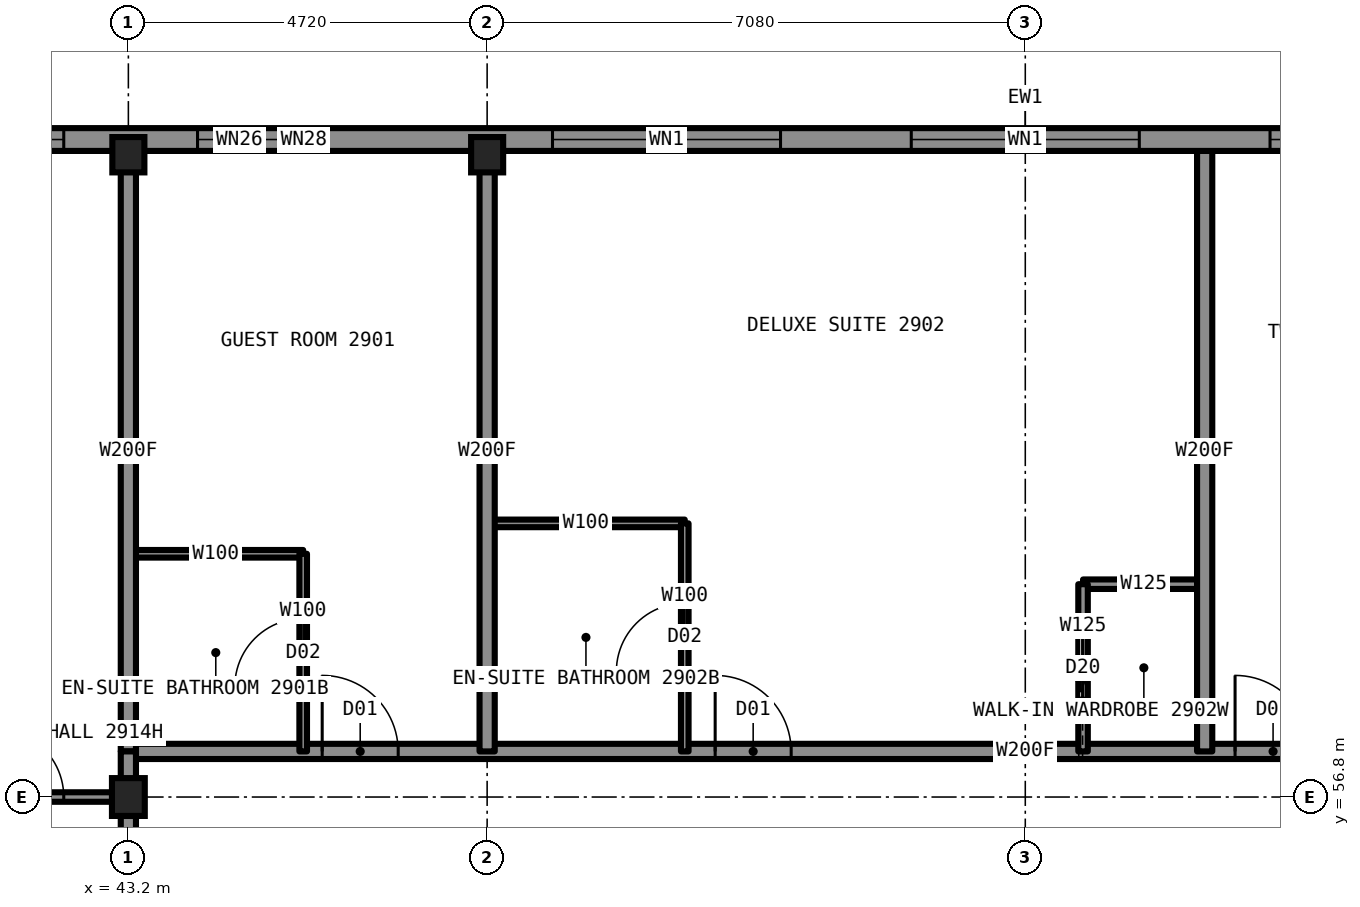
"""IFC4 building model, lengths in metres.
Left out: names, types, materials, properties, quantities, classifications, styles, units other than length and angle.
Written with IfcOpenShell. Run it as: python <this file> out.ifc"""

import sys

from ifc_helpers import new_model, si_unit, direction, frame, frame_2d, origin, origin_2d, place, context, subcontext, project, spatial, rectangle, i_section, extrude, element, fill, save


model = new_model("IFC4")
c1 = context("Model", 3, precision=1e-05, world=origin(), true_north=direction((0.0, 1.0)))
c2 = subcontext(c1, "Body", "Model", "MODEL_VIEW")
j1 = project(units=[si_unit("LENGTHUNIT", "METRE"), si_unit("PLANEANGLEUNIT", "RADIAN")], contexts=[c1])
p1 = place(None, origin())
s1 = spatial("IfcSite", under=j1, at=p1, CompositionType="ELEMENT")
p2 = place(p1, origin())
s2 = spatial("IfcBuilding", under=s1, at=p2, CompositionType="ELEMENT")
p3 = place(p2, frame((0.0, 0.0, 103.9)))
s3 = spatial("IfcBuildingStorey", under=s2, at=p3, CompositionType="ELEMENT", Elevation=103.9)
for number, where, z_axis, x_axis in (
    (1, (43.2, 65.25, 0.0), (0.0, 0.0, 1.0), (1.0, 0.0, 0.0)),
    (2, (47.92, 65.25, 0.0), (0.0, 0.0, 1.0), (1.0, 0.0, 0.0)),
):
    element("IfcColumn", number, at=place(p3, frame(where, z_axis=z_axis, x_axis=x_axis)), inside=s3, PredefinedType="COLUMN", context=c2, shape_type="SweptSolid", body=[
        extrude(i_section(OverallWidth=0.422, OverallDepth=0.465, WebThickness=0.045, FlangeThickness=0.073, at=origin_2d()), origin(), (0.0, 0.0, 1.0), 3.5),
    ])
p4 = place(p3, frame((43.2, 56.8, 0.0), z_axis=(0.0, 0.0, 1.0), x_axis=(1.0, 0.0, 0.0)))
e3 = element("IfcColumn", 3, at=p4, inside=s3, PredefinedType="COLUMN", context=c2, shape_type="SweptSolid", body=[
    extrude(i_section(OverallWidth=0.432, OverallDepth=0.498, WebThickness=0.056, FlangeThickness=0.089, at=origin_2d()), origin(), (0.0, 0.0, 1.0), 3.5),
])
p5 = place(p3, frame((34.7, 56.8, 0.0), z_axis=(0.0, 0.0, 1.0), x_axis=(1.0, 0.0, 0.0)))
e4 = element("IfcWall", 4, at=p5, inside=s3, PredefinedType="PARTITIONING", context=c2, shape_type="SweptSolid", body=[
    extrude(rectangle(XDim=8.5, YDim=0.125, at=frame_2d((4.25, 0.0))), origin(), (0.0, 0.0, 1.0), 2.573),
])
p6 = place(p5, frame((6.75, 0.0, 0.0)))
e5 = element("IfcOpeningElement", 5, at=p6, cuts=e4, PredefinedType="OPENING", context=c2, shape_type="SweptSolid", body=[
    extrude(rectangle(XDim=0.9, YDim=2.2, at=frame_2d((0.45, 1.1))), frame((0.0, 0.073, 0.0), z_axis=(0.0, -1.0, 0.0), x_axis=(1.0, 0.0, 0.0)), (0.0, 0.0, 1.0), 0.145),
])
p7 = place(p3, frame((43.2, 57.4, 0.0), z_axis=(0.0, 0.0, 1.0), x_axis=(1.0, 0.0, 0.0)))
e6 = element("IfcWall", 6, at=p7, inside=s3, PredefinedType="PARTITIONING", context=c2, shape_type="SweptSolid", body=[
    extrude(rectangle(XDim=23.6, YDim=0.2, at=frame_2d((11.8, 0.0))), origin(), (0.0, 0.0, 1.0), 3.33),
])
p8 = place(p7, frame((2.55, 0.0, 0.0)))
e7 = element("IfcOpeningElement", 7, at=p8, cuts=e6, PredefinedType="OPENING", context=c2, shape_type="SweptSolid", body=[
    extrude(rectangle(XDim=1.0, YDim=2.2, at=frame_2d((0.5, 1.1))), frame((0.0, 0.11, 0.0), z_axis=(0.0, -1.0, 0.0), x_axis=(1.0, 0.0, 0.0)), (0.0, 0.0, 1.0), 0.22),
])
p9 = place(p7, frame((7.72, 0.0, 0.0)))
e8 = element("IfcOpeningElement", 8, at=p9, cuts=e6, PredefinedType="OPENING", context=c2, shape_type="SweptSolid", body=[
    extrude(rectangle(XDim=1.0, YDim=2.2, at=frame_2d((0.5, 1.1))), frame((0.0, 0.11, 0.0), z_axis=(0.0, -1.0, 0.0), x_axis=(1.0, 0.0, 0.0)), (0.0, 0.0, 1.0), 0.22),
])
p10 = place(p7, frame((14.56, 0.0, 0.0)))
e9 = element("IfcOpeningElement", 9, at=p10, cuts=e6, PredefinedType="OPENING", context=c2, shape_type="SweptSolid", body=[
    extrude(rectangle(XDim=1.0, YDim=2.2, at=frame_2d((0.5, 1.1))), frame((0.0, 0.11, 0.0), z_axis=(0.0, -1.0, 0.0), x_axis=(1.0, 0.0, 0.0)), (0.0, 0.0, 1.0), 0.22),
])
p11 = place(p7, frame((20.34, 0.0, 0.0)))
e10 = element("IfcOpeningElement", 10, at=p11, cuts=e6, PredefinedType="OPENING", context=c2, shape_type="SweptSolid", body=[
    extrude(rectangle(XDim=1.0, YDim=2.2, at=frame_2d((0.5, 1.1))), frame((0.0, 0.11, 0.0), z_axis=(0.0, -1.0, 0.0), x_axis=(1.0, 0.0, 0.0)), (0.0, 0.0, 1.0), 0.22),
])
p12 = place(p3, frame((55.76, 59.6, 0.0), z_axis=(0.0, 0.0, 1.0), x_axis=(1.0, 0.0, 0.0)))
e11 = element("IfcWall", 11, at=p12, inside=s3, PredefinedType="PARTITIONING", context=c2, shape_type="SweptSolid", body=[
    extrude(rectangle(XDim=1.6, YDim=0.125, at=frame_2d((0.8, 0.0))), origin(), (0.0, 0.0, 1.0), 3.33),
])
p13 = place(p3, frame((43.2, 60.0, 0.0), z_axis=(0.0, 0.0, 1.0), x_axis=(1.0, 0.0, 0.0)))
e12 = element("IfcWall", 12, at=p13, inside=s3, PredefinedType="PARTITIONING", context=c2, shape_type="SweptSolid", body=[
    extrude(rectangle(XDim=2.3, YDim=0.1, at=frame_2d((1.15, 0.0))), origin(), (0.0, 0.0, 1.0), 2.731),
])
p14 = place(p3, frame((47.92, 60.4, 0.0), z_axis=(0.0, 0.0, 1.0), x_axis=(1.0, 0.0, 0.0)))
e13 = element("IfcWall", 13, at=p14, inside=s3, PredefinedType="PARTITIONING", context=c2, shape_type="SweptSolid", body=[
    extrude(rectangle(XDim=2.6, YDim=0.1, at=frame_2d((1.3, 0.0))), origin(), (0.0, 0.0, 1.0), 3.33),
])
p15 = place(p3, frame((43.2, 33.2, 0.0), z_axis=(0.0, 0.0, 1.0), x_axis=(0.0, 1.0, 0.0)))
e14 = element("IfcWall", 14, at=p15, inside=s3, PredefinedType="PARTITIONING", context=c2, shape_type="SweptSolid", body=[
    extrude(rectangle(XDim=23.58, YDim=0.2, at=frame_2d((11.79, 0.0))), origin(), (0.0, 0.0, 1.0), 3.33),
])
p16 = place(p15, frame((7.72, 0.0, 0.0)))
e15 = element("IfcOpeningElement", 15, at=p16, cuts=e14, PredefinedType="OPENING", context=c2, shape_type="SweptSolid", body=[
    extrude(rectangle(XDim=1.0, YDim=2.2, at=frame_2d((0.5, 1.1))), frame((0.0, 0.11, 0.0), z_axis=(0.0, -1.0, 0.0), x_axis=(1.0, 0.0, 0.0)), (0.0, 0.0, 1.0), 0.22),
])
p17 = place(p15, frame((14.56, 0.0, 0.0)))
e16 = element("IfcOpeningElement", 16, at=p17, cuts=e14, PredefinedType="OPENING", context=c2, shape_type="SweptSolid", body=[
    extrude(rectangle(XDim=1.0, YDim=2.2, at=frame_2d((0.5, 1.1))), frame((0.0, 0.11, 0.0), z_axis=(0.0, -1.0, 0.0), x_axis=(1.0, 0.0, 0.0)), (0.0, 0.0, 1.0), 0.22),
])
p18 = place(p15, frame((21.84, 0.0, 0.0)))
e17 = element("IfcOpeningElement", 17, at=p18, cuts=e14, PredefinedType="OPENING", context=c2, shape_type="SweptSolid", body=[
    extrude(rectangle(XDim=1.1, YDim=2.2, at=frame_2d((0.55, 1.1))), frame((0.0, 0.11, 0.0), z_axis=(0.0, -1.0, 0.0), x_axis=(1.0, 0.0, 0.0)), (0.0, 0.0, 1.0), 0.22),
])
p19 = place(p15, frame((0.66, 0.0, 0.0)))
e18 = element("IfcOpeningElement", 18, at=p19, cuts=e14, PredefinedType="OPENING", context=c2, shape_type="SweptSolid", body=[
    extrude(rectangle(XDim=1.1, YDim=2.2, at=frame_2d((0.55, 1.1))), frame((0.0, 0.11, 0.0), z_axis=(0.0, -1.0, 0.0), x_axis=(1.0, 0.0, 0.0)), (0.0, 0.0, 1.0), 0.22),
])
p20 = place(p3, frame((43.2, 57.4, 0.0), z_axis=(0.0, 0.0, 1.0), x_axis=(0.0, 1.0, 0.0)))
e19 = element("IfcWall", 19, at=p20, inside=s3, PredefinedType="PARTITIONING", context=c2, shape_type="SweptSolid", body=[
    extrude(rectangle(XDim=7.9, YDim=0.2, at=frame_2d((3.95, 0.0))), origin(), (0.0, 0.0, 1.0), 2.573),
])
p21 = place(p3, frame((50.52, 57.4, 0.0), z_axis=(0.0, 0.0, 1.0), x_axis=(0.0, 1.0, 0.0)))
e20 = element("IfcWall", 20, at=p21, inside=s3, PredefinedType="PARTITIONING", context=c2, shape_type="SweptSolid", body=[
    extrude(rectangle(XDim=3.0, YDim=0.1, at=frame_2d((1.5, 0.0))), origin(), (0.0, 0.0, 1.0), 3.33),
])
p22 = place(p21, frame((1.05, 0.0, 0.0)))
e21 = element("IfcOpeningElement", 21, at=p22, cuts=e20, PredefinedType="OPENING", context=c2, shape_type="SweptSolid", body=[
    extrude(rectangle(XDim=0.9, YDim=2.1, at=frame_2d((0.45, 1.05))), frame((0.0, 0.06, 0.0), z_axis=(0.0, -1.0, 0.0), x_axis=(1.0, 0.0, 0.0)), (0.0, 0.0, 1.0), 0.12),
])
p23 = place(p3, frame((47.92, 57.4, 0.0), z_axis=(0.0, 0.0, 1.0), x_axis=(0.0, 1.0, 0.0)))
e22 = element("IfcWall", 22, at=p23, inside=s3, PredefinedType="PARTITIONING", context=c2, shape_type="SweptSolid", body=[
    extrude(rectangle(XDim=7.9, YDim=0.2, at=frame_2d((3.95, 0.0))), origin(), (0.0, 0.0, 1.0), 2.573),
])
p24 = place(p3, frame((45.5, 57.4, 0.0), z_axis=(0.0, 0.0, 1.0), x_axis=(0.0, 1.0, 0.0)))
e23 = element("IfcWall", 23, at=p24, inside=s3, PredefinedType="PARTITIONING", context=c2, shape_type="SweptSolid", body=[
    extrude(rectangle(XDim=2.6, YDim=0.1, at=frame_2d((1.3, 0.0))), origin(), (0.0, 0.0, 1.0), 3.33),
])
p25 = place(p24, frame((0.85, 0.0, 0.0)))
e24 = element("IfcOpeningElement", 24, at=p25, cuts=e23, PredefinedType="OPENING", context=c2, shape_type="SweptSolid", body=[
    extrude(rectangle(XDim=0.9, YDim=2.1, at=frame_2d((0.45, 1.05))), frame((0.0, 0.06, 0.0), z_axis=(0.0, -1.0, 0.0), x_axis=(1.0, 0.0, 0.0)), (0.0, 0.0, 1.0), 0.12),
])
p26 = place(p3, frame((55.76, 57.4, 0.0), z_axis=(0.0, 0.0, 1.0), x_axis=(0.0, 1.0, 0.0)))
e25 = element("IfcWall", 25, at=p26, inside=s3, PredefinedType="PARTITIONING", context=c2, shape_type="SweptSolid", body=[
    extrude(rectangle(XDim=2.2, YDim=0.125, at=frame_2d((1.1, 0.0))), origin(), (0.0, 0.0, 1.0), 3.33),
])
p27 = place(p26, frame((0.7, 0.0, 0.0)))
e26 = element("IfcOpeningElement", 26, at=p27, cuts=e25, PredefinedType="OPENING", context=c2, shape_type="SweptSolid", body=[
    extrude(rectangle(XDim=0.8, YDim=2.1, at=frame_2d((0.4, 1.05))), frame((0.0, 0.073, 0.0), z_axis=(0.0, -1.0, 0.0), x_axis=(1.0, 0.0, 0.0)), (0.0, 0.0, 1.0), 0.145),
])
p28 = place(p3, frame((57.36, 57.4, 0.0), z_axis=(0.0, 0.0, 1.0), x_axis=(0.0, 1.0, 0.0)))
e27 = element("IfcWall", 27, at=p28, inside=s3, PredefinedType="PARTITIONING", context=c2, shape_type="SweptSolid", body=[
    extrude(rectangle(XDim=7.9, YDim=0.2, at=frame_2d((3.95, 0.0))), origin(), (0.0, 0.0, 1.0), 3.33),
])
p29 = place(p3, frame((70.1, 65.45, 0.0), z_axis=(0.0, 0.0, 1.0), x_axis=(-1.0, 0.0, 0.0)))
e28 = element("IfcWall", 28, at=p29, inside=s3, PredefinedType="SOLIDWALL", context=c2, shape_type="SweptSolid", body=[
    extrude(rectangle(XDim=30.2, YDim=0.3, at=frame_2d((15.1, 0.0))), origin(), (0.0, 0.0, 1.0), 2.83),
])
p30 = place(p29, frame((4.16, 0.0, 0.5)))
e29 = element("IfcOpeningElement", 29, at=p30, cuts=e28, PredefinedType="OPENING", context=c2, shape_type="SweptSolid", body=[
    extrude(rectangle(XDim=3.0, YDim=2.0, at=frame_2d((1.5, 1.0))), frame((0.0, 0.16, 0.0), z_axis=(0.0, -1.0, 0.0), x_axis=(1.0, 0.0, 0.0)), (0.0, 0.0, 1.0), 0.32),
])
p31 = place(p29, frame((8.88, 0.0, 0.5)))
e30 = element("IfcOpeningElement", 30, at=p31, cuts=e28, PredefinedType="OPENING", context=c2, shape_type="SweptSolid", body=[
    extrude(rectangle(XDim=3.0, YDim=2.0, at=frame_2d((1.5, 1.0))), frame((0.0, 0.16, 0.0), z_axis=(0.0, -1.0, 0.0), x_axis=(1.0, 0.0, 0.0)), (0.0, 0.0, 1.0), 0.32),
])
p32 = place(p29, frame((13.6, 0.0, 0.5)))
e31 = element("IfcOpeningElement", 31, at=p32, cuts=e28, PredefinedType="OPENING", context=c2, shape_type="SweptSolid", body=[
    extrude(rectangle(XDim=3.0, YDim=2.0, at=frame_2d((1.5, 1.0))), frame((0.0, 0.16, 0.0), z_axis=(0.0, -1.0, 0.0), x_axis=(1.0, 0.0, 0.0)), (0.0, 0.0, 1.0), 0.32),
])
p33 = place(p29, frame((18.32, 0.0, 0.5)))
e32 = element("IfcOpeningElement", 32, at=p33, cuts=e28, PredefinedType="OPENING", context=c2, shape_type="SweptSolid", body=[
    extrude(rectangle(XDim=3.0, YDim=2.0, at=frame_2d((1.5, 1.0))), frame((0.0, 0.16, 0.0), z_axis=(0.0, -1.0, 0.0), x_axis=(1.0, 0.0, 0.0)), (0.0, 0.0, 1.0), 0.32),
])
p34 = place(p29, frame((23.04, 0.0, 0.5)))
e33 = element("IfcOpeningElement", 33, at=p34, cuts=e28, PredefinedType="OPENING", context=c2, shape_type="SweptSolid", body=[
    extrude(rectangle(XDim=3.0, YDim=2.0, at=frame_2d((1.5, 1.0))), frame((0.0, 0.16, 0.0), z_axis=(0.0, -1.0, 0.0), x_axis=(1.0, 0.0, 0.0)), (0.0, 0.0, 1.0), 0.32),
])
p35 = place(p3, frame((43.2, 56.78, 0.0), z_axis=(0.0, 0.0, 1.0), x_axis=(0.0, 1.0, 0.0)))
e34 = element("IfcWall", 34, at=p35, inside=s3, PredefinedType="PARTITIONING", context=c2, shape_type="SweptSolid", body=[
    extrude(rectangle(XDim=0.62, YDim=0.2, at=frame_2d((0.31, 0.0))), origin(), (0.0, 0.0, 1.0), 2.573),
])
p36 = place(p8, origin())
e35 = element("IfcDoor", 35, at=p36, inside=s3, OperationType="SINGLE_SWING_LEFT", PredefinedType="DOOR", context=c2, shape_type="SweptSolid", body=[
    extrude(rectangle(XDim=1.0, YDim=2.2, at=frame_2d((0.5, 1.1))), frame((0.0, 0.025, 0.0), z_axis=(0.0, -1.0, 0.0), x_axis=(1.0, 0.0, 0.0)), (0.0, 0.0, 1.0), 0.05),
])
fill(e7, e35)
p37 = place(p25, origin())
e36 = element("IfcDoor", 36, at=p37, inside=s3, OperationType="SINGLE_SWING_RIGHT", PredefinedType="DOOR", context=c2, shape_type="SweptSolid", body=[
    extrude(rectangle(XDim=0.9, YDim=2.1, at=frame_2d((0.45, 1.05))), frame((0.0, 0.025, 0.0), z_axis=(0.0, -1.0, 0.0), x_axis=(1.0, 0.0, 0.0)), (0.0, 0.0, 1.0), 0.05),
])
fill(e24, e36)
p38 = place(p9, origin())
e37 = element("IfcDoor", 37, at=p38, inside=s3, OperationType="SINGLE_SWING_LEFT", PredefinedType="DOOR", context=c2, shape_type="SweptSolid", body=[
    extrude(rectangle(XDim=1.0, YDim=2.2, at=frame_2d((0.5, 1.1))), frame((0.0, 0.025, 0.0), z_axis=(0.0, -1.0, 0.0), x_axis=(1.0, 0.0, 0.0)), (0.0, 0.0, 1.0), 0.05),
])
fill(e8, e37)
p39 = place(p22, origin())
e38 = element("IfcDoor", 38, at=p39, inside=s3, OperationType="SINGLE_SWING_RIGHT", PredefinedType="DOOR", context=c2, shape_type="SweptSolid", body=[
    extrude(rectangle(XDim=0.9, YDim=2.1, at=frame_2d((0.45, 1.05))), frame((0.0, 0.025, 0.0), z_axis=(0.0, -1.0, 0.0), x_axis=(1.0, 0.0, 0.0)), (0.0, 0.0, 1.0), 0.05),
])
fill(e21, e38)
p40 = place(p27, origin())
e39 = element("IfcDoor", 39, at=p40, inside=s3, OperationType="SLIDING_TO_LEFT", PredefinedType="DOOR", context=c2, shape_type="SweptSolid", body=[
    extrude(rectangle(XDim=0.8, YDim=2.1, at=frame_2d((0.4, 1.05))), frame((0.0, 0.025, 0.0), z_axis=(0.0, -1.0, 0.0), x_axis=(1.0, 0.0, 0.0)), (0.0, 0.0, 1.0), 0.05),
])
fill(e26, e39)
p41 = place(p10, origin())
e40 = element("IfcDoor", 40, at=p41, inside=s3, OperationType="SINGLE_SWING_LEFT", PredefinedType="DOOR", context=c2, shape_type="SweptSolid", body=[
    extrude(rectangle(XDim=1.0, YDim=2.2, at=frame_2d((0.5, 1.1))), frame((0.0, 0.025, 0.0), z_axis=(0.0, -1.0, 0.0), x_axis=(1.0, 0.0, 0.0)), (0.0, 0.0, 1.0), 0.05),
])
fill(e9, e40)
p42 = place(p6, origin())
e41 = element("IfcDoor", 41, at=p42, inside=s3, OperationType="SINGLE_SWING_LEFT", PredefinedType="DOOR", context=c2, shape_type="SweptSolid", body=[
    extrude(rectangle(XDim=0.9, YDim=2.2, at=frame_2d((0.45, 1.1))), frame((0.0, 0.025, 0.0), z_axis=(0.0, -1.0, 0.0), x_axis=(1.0, 0.0, 0.0)), (0.0, 0.0, 1.0), 0.05),
])
fill(e5, e41)
p43 = place(p31, origin())
e42 = element("IfcWindow", 42, at=p43, inside=s3, PartitioningType="SINGLE_PANEL", PredefinedType="WINDOW", context=c2, shape_type="SweptSolid", body=[
    extrude(rectangle(XDim=3.0, YDim=2.0, at=frame_2d((1.5, 1.0))), frame((0.0, 0.03, 0.0), z_axis=(0.0, -1.0, 0.0), x_axis=(1.0, 0.0, 0.0)), (0.0, 0.0, 1.0), 0.06),
])
fill(e30, e42)
p44 = place(p32, origin())
e43 = element("IfcWindow", 43, at=p44, inside=s3, PartitioningType="SINGLE_PANEL", PredefinedType="WINDOW", context=c2, shape_type="SweptSolid", body=[
    extrude(rectangle(XDim=3.0, YDim=2.0, at=frame_2d((1.5, 1.0))), frame((0.0, 0.03, 0.0), z_axis=(0.0, -1.0, 0.0), x_axis=(1.0, 0.0, 0.0)), (0.0, 0.0, 1.0), 0.06),
])
fill(e31, e43)
p45 = place(p33, origin())
e44 = element("IfcWindow", 44, at=p45, inside=s3, PartitioningType="SINGLE_PANEL", PredefinedType="WINDOW", context=c2, shape_type="SweptSolid", body=[
    extrude(rectangle(XDim=3.0, YDim=2.0, at=frame_2d((1.5, 1.0))), frame((0.0, 0.03, 0.0), z_axis=(0.0, -1.0, 0.0), x_axis=(1.0, 0.0, 0.0)), (0.0, 0.0, 1.0), 0.06),
])
fill(e32, e44)
p46 = place(p34, origin())
e45 = element("IfcWindow", 45, at=p46, inside=s3, PartitioningType="SINGLE_PANEL", PredefinedType="WINDOW", context=c2, shape_type="SweptSolid", body=[
    extrude(rectangle(XDim=3.0, YDim=2.0, at=frame_2d((1.5, 1.0))), frame((0.0, 0.03, 0.0), z_axis=(0.0, -1.0, 0.0), x_axis=(1.0, 0.0, 0.0)), (0.0, 0.0, 1.0), 0.06),
])
fill(e33, e45)
save(model, sys.argv[1])
